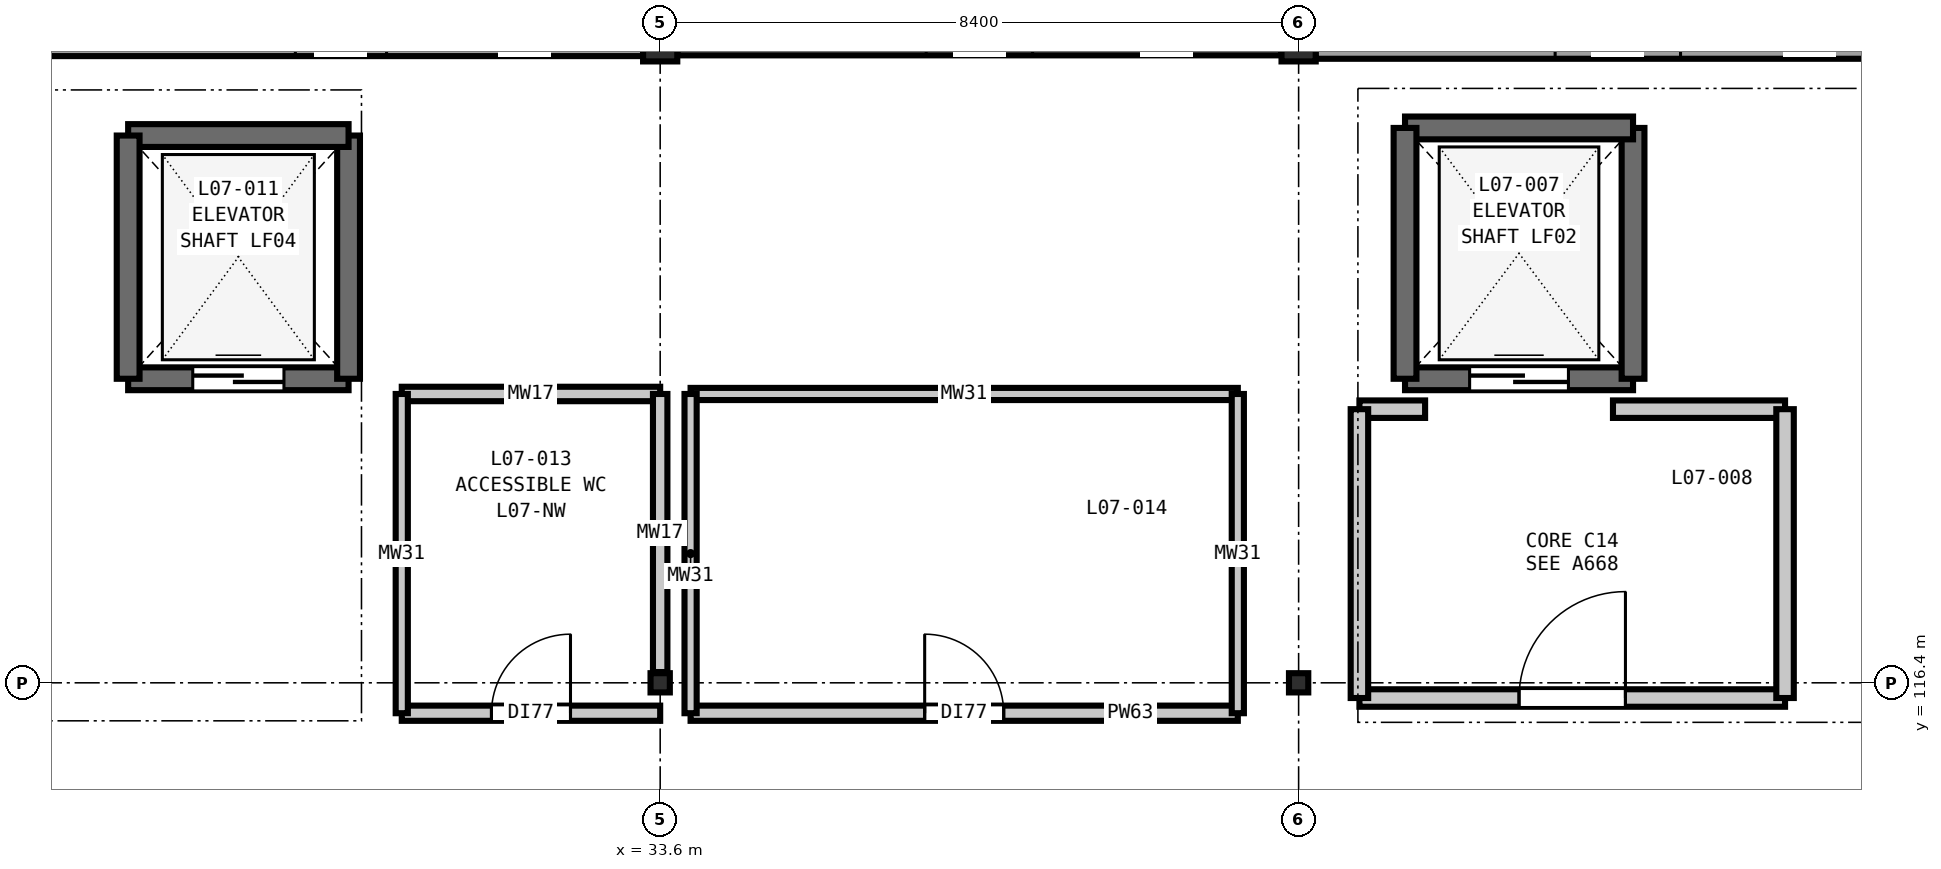
"""IFC4 building model, lengths in metres.
Left out: names, types, materials, properties, quantities, classifications, styles, units other than length and angle.
Written with IfcOpenShell. Run it as: python <this file> out.ifc"""

import sys

from ifc_helpers import new_model, si_unit, direction, frame, frame_2d, origin, origin_2d, place, context, subcontext, project, spatial, rectangle, i_section, extrude, element, fill, save


model = new_model("IFC4")
c1 = context("Model", 3, precision=1e-05, world=origin(), true_north=direction((0.0, 1.0)))
c2 = subcontext(c1, "Body", "Model", "MODEL_VIEW")
j1 = project(units=[si_unit("LENGTHUNIT", "METRE"), si_unit("PLANEANGLEUNIT", "RADIAN")], contexts=[c1])
p1 = place(None, origin())
s1 = spatial("IfcSite", under=j1, at=p1, CompositionType="ELEMENT")
p2 = place(p1, origin())
s2 = spatial("IfcBuilding", under=s1, at=p2, CompositionType="ELEMENT")
p3 = place(p2, frame((0.0, 0.0, 33.0)))
s3 = spatial("IfcBuildingStorey", under=s2, at=p3, CompositionType="ELEMENT", Elevation=33.0)
p4 = place(p3, frame((33.6, 116.4, 0.0), z_axis=(0.0, 0.0, 1.0), x_axis=(1.0, 0.0, 0.0)))
e1 = element("IfcColumn", 1, at=p4, inside=s3, PredefinedType="COLUMN", context=c2, shape_type="SweptSolid", body=[
    extrude(i_section(OverallWidth=0.254, OverallDepth=0.253, WebThickness=0.009, FlangeThickness=0.014, FilletRadius=0.013, at=origin_2d()), origin(), (0.0, 0.0, 1.0), 4.2),
])
p5 = place(p3, frame((33.6, 124.8, 0.0), z_axis=(0.0, 0.0, 1.0), x_axis=(1.0, 0.0, 0.0)))
e2 = element("IfcColumn", 2, at=p5, inside=s3, PredefinedType="COLUMN", context=c2, shape_type="SweptSolid", body=[
    extrude(rectangle(XDim=0.45, YDim=0.45, at=origin_2d()), origin(), (0.0, 0.0, 1.0), 4.2),
])
p6 = place(p3, frame((42.0, 116.4, 0.0), z_axis=(0.0, 0.0, 1.0), x_axis=(1.0, 0.0, 0.0)))
e3 = element("IfcColumn", 3, at=p6, inside=s3, PredefinedType="COLUMN", context=c2, shape_type="SweptSolid", body=[
    extrude(i_section(OverallWidth=0.254, OverallDepth=0.253, WebThickness=0.009, FlangeThickness=0.014, FilletRadius=0.013, at=origin_2d()), origin(), (0.0, 0.0, 1.0), 4.2),
])
p7 = place(p3, frame((42.0, 124.8, 0.0), z_axis=(0.0, 0.0, 1.0), x_axis=(1.0, 0.0, 0.0)))
e4 = element("IfcColumn", 4, at=p7, inside=s3, PredefinedType="COLUMN", context=c2, shape_type="SweptSolid", body=[
    extrude(rectangle(XDim=0.45, YDim=0.45, at=origin_2d()), origin(), (0.0, 0.0, 1.0), 4.2),
])
p8 = place(p3, frame((25.423, 124.8, 0.0), z_axis=(0.0, 0.0, 1.0), x_axis=(1.0, 0.0, 0.0)))
e5 = element("IfcWall", 5, at=p8, inside=s3, PredefinedType="SOLIDWALL", context=c2, shape_type="SweptSolid", body=[
    extrude(rectangle(XDim=7.954, YDim=0.31, at=frame_2d((3.977, 0.0))), origin(), (0.0, 0.0, 1.0), 3.48),
])
p9 = place(p8, frame((3.377, 0.0, 0.9)))
e6 = element("IfcOpeningElement", 6, at=p9, cuts=e5, PredefinedType="OPENING", context=c2, shape_type="SweptSolid", body=[
    extrude(rectangle(XDim=1.2, YDim=2.15, at=frame_2d((0.6, 1.075))), frame((0.0, 0.165, 0.0), z_axis=(0.0, -1.0, 0.0), x_axis=(1.0, 0.0, 0.0)), (0.0, 0.0, 1.0), 0.33),
])
p10 = place(p3, frame((33.823, 124.8, 0.0), z_axis=(0.0, 0.0, 1.0), x_axis=(1.0, 0.0, 0.0)))
e7 = element("IfcWall", 7, at=p10, inside=s3, PredefinedType="SOLIDWALL", context=c2, shape_type="SweptSolid", body=[
    extrude(rectangle(XDim=7.954, YDim=0.29, at=frame_2d((3.977, 0.0))), origin(), (0.0, 0.0, 1.0), 3.48),
])
p11 = place(p10, frame((3.277, 0.0, 0.9)))
e8 = element("IfcOpeningElement", 8, at=p11, cuts=e7, PredefinedType="OPENING", context=c2, shape_type="SweptSolid", body=[
    extrude(rectangle(XDim=1.4, YDim=2.15, at=frame_2d((0.7, 1.075))), frame((0.0, 0.155, 0.0), z_axis=(0.0, -1.0, 0.0), x_axis=(1.0, 0.0, 0.0)), (0.0, 0.0, 1.0), 0.31),
])
p12 = place(p3, frame((42.223, 124.8, 0.0), z_axis=(0.0, 0.0, 1.0), x_axis=(1.0, 0.0, 0.0)))
e9 = element("IfcWall", 9, at=p12, inside=s3, PredefinedType="SOLIDWALL", context=c2, shape_type="SweptSolid", body=[
    extrude(rectangle(XDim=7.954, YDim=0.38, at=frame_2d((3.977, 0.0))), origin(), (0.0, 0.0, 1.0), 3.48),
])
p13 = place(p12, frame((3.152, 0.0, 0.9)))
e10 = element("IfcOpeningElement", 10, at=p13, cuts=e9, PredefinedType="OPENING", context=c2, shape_type="SweptSolid", body=[
    extrude(rectangle(XDim=1.65, YDim=2.15, at=frame_2d((0.825, 1.075))), frame((0.0, 0.2, 0.0), z_axis=(0.0, -1.0, 0.0), x_axis=(1.0, 0.0, 0.0)), (0.0, 0.0, 1.0), 0.4),
])
p14 = place(p3, frame((43.4, 120.4, 0.0), z_axis=(0.0, 0.0, 1.0), x_axis=(1.0, 0.0, 0.0)))
e11 = element("IfcWall", 11, at=p14, inside=s3, PredefinedType="SHEAR", context=c2, shape_type="SweptSolid", body=[
    extrude(rectangle(XDim=3.0, YDim=0.3, at=frame_2d((1.5, 0.0))), origin(), (0.0, 0.0, 1.0), 4.2),
])
p15 = place(p14, frame((0.85, 0.0, 0.0)))
e12 = element("IfcOpeningElement", 12, at=p15, cuts=e11, PredefinedType="OPENING", context=c2, shape_type="SweptSolid", body=[
    extrude(rectangle(XDim=1.3, YDim=2.2, at=frame_2d((0.65, 1.1))), frame((0.0, 0.16, 0.0), z_axis=(0.0, -1.0, 0.0), x_axis=(1.0, 0.0, 0.0)), (0.0, 0.0, 1.0), 0.32),
])
p16 = place(p3, frame((46.4, 120.4, 0.0), z_axis=(0.0, 0.0, 1.0), x_axis=(0.0, 1.0, 0.0)))
e13 = element("IfcWall", 13, at=p16, inside=s3, PredefinedType="SHEAR", context=c2, shape_type="SweptSolid", body=[
    extrude(rectangle(XDim=3.3, YDim=0.3, at=frame_2d((1.65, 0.0))), origin(), (0.0, 0.0, 1.0), 4.2),
])
p17 = place(p3, frame((46.4, 123.7, 0.0), z_axis=(0.0, 0.0, 1.0), x_axis=(-1.0, 0.0, 0.0)))
e14 = element("IfcWall", 14, at=p17, inside=s3, PredefinedType="SHEAR", context=c2, shape_type="SweptSolid", body=[
    extrude(rectangle(XDim=3.0, YDim=0.3, at=frame_2d((1.5, 0.0))), origin(), (0.0, 0.0, 1.0), 4.2),
])
p18 = place(p3, frame((43.4, 123.7, 0.0), z_axis=(0.0, 0.0, 1.0), x_axis=(0.0, -1.0, 0.0)))
e15 = element("IfcWall", 15, at=p18, inside=s3, PredefinedType="SHEAR", context=c2, shape_type="SweptSolid", body=[
    extrude(rectangle(XDim=3.3, YDim=0.3, at=frame_2d((1.65, 0.0))), origin(), (0.0, 0.0, 1.0), 4.2),
])
p19 = place(p3, frame((26.6, 120.4, 0.0), z_axis=(0.0, 0.0, 1.0), x_axis=(1.0, 0.0, 0.0)))
e16 = element("IfcWall", 16, at=p19, inside=s3, PredefinedType="SHEAR", context=c2, shape_type="SweptSolid", body=[
    extrude(rectangle(XDim=2.9, YDim=0.3, at=frame_2d((1.45, 0.0))), origin(), (0.0, 0.0, 1.0), 4.2),
])
p20 = place(p19, frame((0.85, 0.0, 0.0)))
e17 = element("IfcOpeningElement", 17, at=p20, cuts=e16, PredefinedType="OPENING", context=c2, shape_type="SweptSolid", body=[
    extrude(rectangle(XDim=1.2, YDim=2.2, at=frame_2d((0.6, 1.1))), frame((0.0, 0.16, 0.0), z_axis=(0.0, -1.0, 0.0), x_axis=(1.0, 0.0, 0.0)), (0.0, 0.0, 1.0), 0.32),
])
p21 = place(p3, frame((29.5, 120.4, 0.0), z_axis=(0.0, 0.0, 1.0), x_axis=(0.0, 1.0, 0.0)))
e18 = element("IfcWall", 18, at=p21, inside=s3, PredefinedType="SHEAR", context=c2, shape_type="SweptSolid", body=[
    extrude(rectangle(XDim=3.2, YDim=0.3, at=frame_2d((1.6, 0.0))), origin(), (0.0, 0.0, 1.0), 4.2),
])
p22 = place(p3, frame((29.5, 123.6, 0.0), z_axis=(0.0, 0.0, 1.0), x_axis=(-1.0, 0.0, 0.0)))
e19 = element("IfcWall", 19, at=p22, inside=s3, PredefinedType="SHEAR", context=c2, shape_type="SweptSolid", body=[
    extrude(rectangle(XDim=2.9, YDim=0.3, at=frame_2d((1.45, 0.0))), origin(), (0.0, 0.0, 1.0), 4.2),
])
p23 = place(p3, frame((26.6, 123.6, 0.0), z_axis=(0.0, 0.0, 1.0), x_axis=(0.0, -1.0, 0.0)))
e20 = element("IfcWall", 20, at=p23, inside=s3, PredefinedType="SHEAR", context=c2, shape_type="SweptSolid", body=[
    extrude(rectangle(XDim=3.2, YDim=0.3, at=frame_2d((1.6, 0.0))), origin(), (0.0, 0.0, 1.0), 4.2),
])
p24 = place(p3, frame((30.2, 116.0, 0.0), z_axis=(0.0, 0.0, 1.0), x_axis=(1.0, 0.0, 0.0)))
e21 = element("IfcWall", 21, at=p24, inside=s3, PredefinedType="PARTITIONING", context=c2, shape_type="SweptSolid", body=[
    extrude(rectangle(XDim=3.4, YDim=0.2, at=frame_2d((1.7, 0.0))), origin(), (0.0, 0.0, 1.0), 3.92),
])
p25 = place(p24, frame((1.18, 0.0, 0.0)))
e22 = element("IfcOpeningElement", 22, at=p25, cuts=e21, PredefinedType="OPENING", context=c2, shape_type="SweptSolid", body=[
    extrude(rectangle(XDim=1.04, YDim=2.1, at=frame_2d((0.52, 1.05))), frame((0.0, 0.11, 0.0), z_axis=(0.0, -1.0, 0.0), x_axis=(1.0, 0.0, 0.0)), (0.0, 0.0, 1.0), 0.22),
])
p26 = place(p3, frame((34.0, 116.0, 0.0), z_axis=(0.0, 0.0, 1.0), x_axis=(1.0, 0.0, 0.0)))
e23 = element("IfcWall", 23, at=p26, inside=s3, PredefinedType="PARTITIONING", context=c2, shape_type="SweptSolid", body=[
    extrude(rectangle(XDim=7.2, YDim=0.2, at=frame_2d((3.6, 0.0))), origin(), (0.0, 0.0, 1.0), 3.92),
])
p27 = place(p26, frame((3.08, 0.0, 0.0)))
e24 = element("IfcOpeningElement", 24, at=p27, cuts=e23, PredefinedType="OPENING", context=c2, shape_type="SweptSolid", body=[
    extrude(rectangle(XDim=1.04, YDim=2.1, at=frame_2d((0.52, 1.05))), frame((0.0, 0.11, 0.0), z_axis=(0.0, -1.0, 0.0), x_axis=(1.0, 0.0, 0.0)), (0.0, 0.0, 1.0), 0.22),
])
p28 = place(p3, frame((42.8, 116.2, 0.0), z_axis=(0.0, 0.0, 1.0), x_axis=(1.0, 0.0, 0.0)))
e25 = element("IfcWall", 25, at=p28, inside=s3, PredefinedType="PARTITIONING", context=c2, shape_type="SweptSolid", body=[
    extrude(rectangle(XDim=5.6, YDim=0.23, at=frame_2d((2.8, 0.0))), origin(), (0.0, 0.0, 1.0), 3.685),
])
p29 = place(p28, frame((2.1, 0.0, 0.0)))
e26 = element("IfcOpeningElement", 26, at=p29, cuts=e25, PredefinedType="OPENING", context=c2, shape_type="SweptSolid", body=[
    extrude(rectangle(XDim=1.4, YDim=2.2, at=frame_2d((0.7, 1.1))), frame((0.0, 0.125, 0.0), z_axis=(0.0, -1.0, 0.0), x_axis=(1.0, 0.0, 0.0)), (0.0, 0.0, 1.0), 0.25),
])
p30 = place(p3, frame((46.136, 120.0, 0.0), z_axis=(0.0, 0.0, 1.0), x_axis=(1.0, 0.0, 0.0)))
e27 = element("IfcWall", 27, at=p30, inside=s3, PredefinedType="PARTITIONING", context=c2, shape_type="SweptSolid", body=[
    extrude(rectangle(XDim=2.264, YDim=0.23, at=frame_2d((1.132, 0.0))), origin(), (0.0, 0.0, 1.0), 3.92),
])
p31 = place(p3, frame((42.8, 120.0, 0.0), z_axis=(0.0, 0.0, 1.0), x_axis=(1.0, 0.0, 0.0)))
e28 = element("IfcWall", 28, at=p31, inside=s3, PredefinedType="PARTITIONING", context=c2, shape_type="SweptSolid", body=[
    extrude(rectangle(XDim=0.864, YDim=0.23, at=frame_2d((0.432, 0.0))), origin(), (0.0, 0.0, 1.0), 3.92),
])
p32 = place(p3, frame((30.2, 120.2, 0.0), z_axis=(0.0, 0.0, 1.0), x_axis=(1.0, 0.0, 0.0)))
e29 = element("IfcWall", 29, at=p32, inside=s3, PredefinedType="PLUMBINGWALL", context=c2, shape_type="SweptSolid", body=[
    extrude(rectangle(XDim=3.4, YDim=0.19, at=frame_2d((1.7, 0.0))), origin(), (0.0, 0.0, 1.0), 3.92),
])
p33 = place(p3, frame((34.0, 120.2, 0.0), z_axis=(0.0, 0.0, 1.0), x_axis=(1.0, 0.0, 0.0)))
e30 = element("IfcWall", 30, at=p33, inside=s3, PredefinedType="PLUMBINGWALL", context=c2, shape_type="SweptSolid", body=[
    extrude(rectangle(XDim=7.2, YDim=0.16, at=frame_2d((3.6, 0.0))), origin(), (0.0, 0.0, 1.0), 3.92),
])
p34 = place(p3, frame((30.2, 116.0, 0.0), z_axis=(0.0, 0.0, 1.0), x_axis=(0.0, 1.0, 0.0)))
e31 = element("IfcWall", 31, at=p34, inside=s3, PredefinedType="PLUMBINGWALL", context=c2, shape_type="SweptSolid", body=[
    extrude(rectangle(XDim=4.2, YDim=0.16, at=frame_2d((2.1, 0.0))), origin(), (0.0, 0.0, 1.0), 3.92),
])
p35 = place(p3, frame((33.6, 116.542, 0.0), z_axis=(0.0, 0.0, 1.0), x_axis=(0.0, 1.0, 0.0)))
e32 = element("IfcWall", 32, at=p35, inside=s3, PredefinedType="PLUMBINGWALL", context=c2, shape_type="SweptSolid", body=[
    extrude(rectangle(XDim=3.658, YDim=0.19, at=frame_2d((1.829, 0.0))), origin(), (0.0, 0.0, 1.0), 3.635),
])
for number, where, z_axis, x_axis in (
    (33, (34.0, 116.0, 0.0), (0.0, 0.0, 1.0), (0.0, 1.0, 0.0)),
    (34, (41.2, 116.0, 0.0), (0.0, 0.0, 1.0), (0.0, 1.0, 0.0)),
):
    element("IfcWall", number, at=place(p3, frame(where, z_axis=z_axis, x_axis=x_axis)), inside=s3, PredefinedType="PLUMBINGWALL", context=c2, shape_type="SweptSolid", body=[
        extrude(rectangle(XDim=4.2, YDim=0.16, at=frame_2d((2.1, 0.0))), origin(), (0.0, 0.0, 1.0), 3.92),
    ])
for number, where, z_axis, x_axis in (
    (35, (42.8, 116.2, 0.0), (0.0, 0.0, 1.0), (0.0, 1.0, 0.0)),
    (36, (48.4, 116.2, 0.0), (0.0, 0.0, 1.0), (0.0, 1.0, 0.0)),
):
    element("IfcWall", number, at=place(p3, frame(where, z_axis=z_axis, x_axis=x_axis)), inside=s3, PredefinedType="PARTITIONING", context=c2, shape_type="SweptSolid", body=[
        extrude(rectangle(XDim=3.8, YDim=0.23, at=frame_2d((1.9, 0.0))), origin(), (0.0, 0.0, 1.0), 3.92),
    ])
p36 = place(p15, origin())
e37 = element("IfcDoor", 37, at=p36, inside=s3, OperationType="DOUBLE_DOOR_SLIDING", PredefinedType="DOOR", context=c2, shape_type="SweptSolid", body=[
    extrude(rectangle(XDim=1.3, YDim=2.2, at=frame_2d((0.65, 1.1))), frame((0.0, 0.025, 0.0), z_axis=(0.0, -1.0, 0.0), x_axis=(1.0, 0.0, 0.0)), (0.0, 0.0, 1.0), 0.05),
])
fill(e12, e37)
p37 = place(p20, origin())
e38 = element("IfcDoor", 38, at=p37, inside=s3, OperationType="DOUBLE_DOOR_SLIDING", PredefinedType="DOOR", context=c2, shape_type="SweptSolid", body=[
    extrude(rectangle(XDim=1.2, YDim=2.2, at=frame_2d((0.6, 1.1))), frame((0.0, 0.025, 0.0), z_axis=(0.0, -1.0, 0.0), x_axis=(1.0, 0.0, 0.0)), (0.0, 0.0, 1.0), 0.05),
])
fill(e17, e38)
p38 = place(p25, origin())
e39 = element("IfcDoor", 39, at=p38, inside=s3, OperationType="SINGLE_SWING_RIGHT", PredefinedType="DOOR", context=c2, shape_type="SweptSolid", body=[
    extrude(rectangle(XDim=1.04, YDim=2.1, at=frame_2d((0.52, 1.05))), frame((0.0, 0.025, 0.0), z_axis=(0.0, -1.0, 0.0), x_axis=(1.0, 0.0, 0.0)), (0.0, 0.0, 1.0), 0.05),
])
fill(e22, e39)
p39 = place(p27, origin())
e40 = element("IfcDoor", 40, at=p39, inside=s3, OperationType="SINGLE_SWING_LEFT", PredefinedType="DOOR", context=c2, shape_type="SweptSolid", body=[
    extrude(rectangle(XDim=1.04, YDim=2.1, at=frame_2d((0.52, 1.05))), frame((0.0, 0.025, 0.0), z_axis=(0.0, -1.0, 0.0), x_axis=(1.0, 0.0, 0.0)), (0.0, 0.0, 1.0), 0.05),
])
fill(e24, e40)
p40 = place(p29, origin())
e41 = element("IfcDoor", 41, at=p40, inside=s3, OperationType="SINGLE_SWING_RIGHT", PredefinedType="DOOR", context=c2, shape_type="SweptSolid", body=[
    extrude(rectangle(XDim=1.4, YDim=2.2, at=frame_2d((0.7, 1.1))), frame((0.0, 0.025, 0.0), z_axis=(0.0, -1.0, 0.0), x_axis=(1.0, 0.0, 0.0)), (0.0, 0.0, 1.0), 0.05),
])
fill(e26, e41)
save(model, sys.argv[1])
